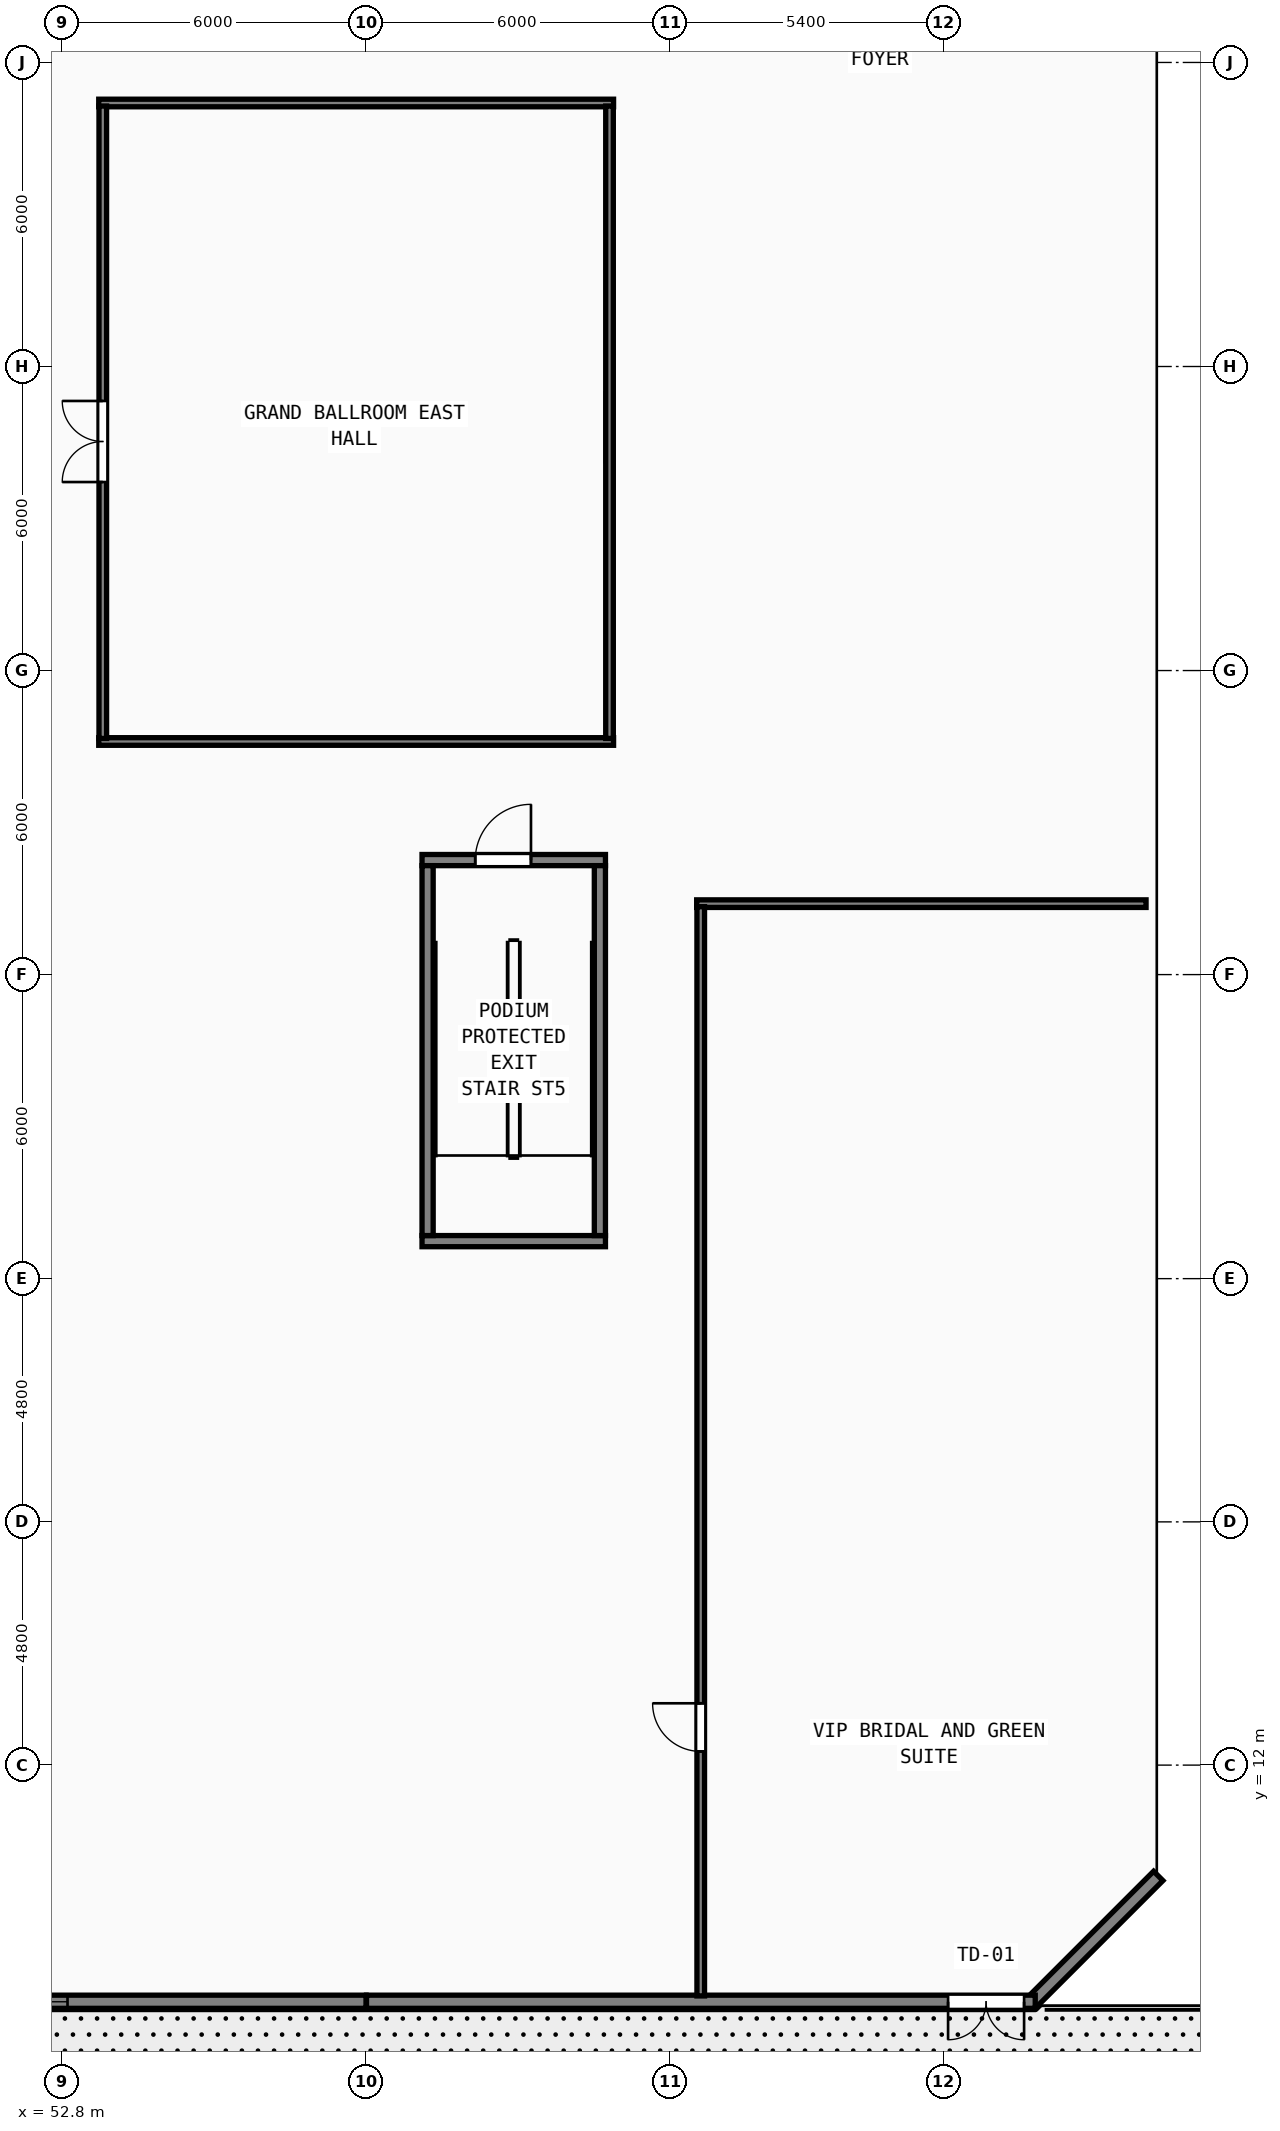
"""IFC4 building model, lengths in metres.
Left out: names, types, materials, properties, quantities, classifications, styles, units other than length and angle.
Written with IfcOpenShell. Run it as: python <this file> out.ifc"""

import sys

from ifc_helpers import new_model, si_unit, direction, frame, frame_2d, origin, origin_2d, place, context, subcontext, project, spatial, rectangle, hollow_rectangle, i_section, extrude, element, fill, save


model = new_model("IFC4")
c1 = context("Model", 3, precision=1e-05, world=origin(), true_north=direction((0.0, 1.0)))
c2 = subcontext(c1, "Body", "Model", "MODEL_VIEW")
j1 = project(units=[si_unit("LENGTHUNIT", "METRE"), si_unit("PLANEANGLEUNIT", "RADIAN")], contexts=[c1])
p1 = place(None, origin())
s1 = spatial("IfcSite", under=j1, at=p1, CompositionType="ELEMENT")
p2 = place(p1, origin())
s2 = spatial("IfcBuilding", under=s1, at=p2, CompositionType="ELEMENT")
p3 = place(p2, frame((0.0, 0.0, 10.2)))
s3 = spatial("IfcBuildingStorey", under=s2, at=p3, CompositionType="ELEMENT", Elevation=10.2)
p4 = place(p3, frame((59.9, 29.86, 0.0), z_axis=(0.0, 0.0, 1.0), x_axis=(1.0, 0.0, 0.0)))
e1 = element("IfcWall", 1, at=p4, inside=s3, PredefinedType="SHEAR", context=c2, shape_type="SweptSolid", body=[
    extrude(rectangle(XDim=3.62, YDim=0.22, at=frame_2d((1.81, 0.0))), origin(), (0.0, 0.0, 1.0), 5.16),
])
p5 = place(p4, frame((1.05, 0.0, 0.0)))
e2 = element("IfcOpeningElement", 2, at=p5, cuts=e1, PredefinedType="OPENING", context=c2, shape_type="SweptSolid", body=[
    extrude(rectangle(XDim=1.1, YDim=2.15, at=frame_2d((0.55, 1.075))), frame((0.0, 0.12, 0.0), z_axis=(0.0, -1.0, 0.0), x_axis=(1.0, 0.0, 0.0)), (0.0, 0.0, 1.0), 0.24),
])
p6 = place(p3, frame((59.9, 22.34, 0.0), z_axis=(0.0, 0.0, 1.0), x_axis=(1.0, 0.0, 0.0)))
e3 = element("IfcWall", 3, at=p6, inside=s3, PredefinedType="SHEAR", context=c2, shape_type="SweptSolid", body=[
    extrude(rectangle(XDim=3.62, YDim=0.22, at=frame_2d((1.81, 0.0))), origin(), (0.0, 0.0, 1.0), 5.16),
])
for number, where, z_axis, x_axis in (
    (4, (60.01, 22.45, 0.0), (0.0, 0.0, 1.0), (0.0, 1.0, 0.0)),
    (5, (63.41, 22.45, 0.0), (0.0, 0.0, 1.0), (0.0, 1.0, 0.0)),
):
    element("IfcWall", number, at=place(p3, frame(where, z_axis=z_axis, x_axis=x_axis)), inside=s3, PredefinedType="SHEAR", context=c2, shape_type="SweptSolid", body=[
        extrude(rectangle(XDim=7.3, YDim=0.22, at=frame_2d((3.65, 0.0))), origin(), (0.0, 0.0, 1.0), 5.16),
    ])
for number, where, z_axis, x_axis in (
    (6, (52.8, 21.6, 0.0), (0.0, 0.0, 1.0), (1.0, 0.0, 0.0)),
    (7, (52.8, 33.6, 0.0), (0.0, 0.0, 1.0), (1.0, 0.0, 0.0)),
    (8, (52.8, 45.6, 0.0), (0.0, 0.0, 1.0), (1.0, 0.0, 0.0)),
    (9, (64.2, 16.8, 0.0), (0.0, 0.0, 1.0), (1.0, 0.0, 0.0)),
    (10, (64.2, 27.6, 0.0), (0.0, 0.0, 1.0), (1.0, 0.0, 0.0)),
    (11, (64.2, 38.4, 0.0), (0.0, 0.0, 1.0), (1.0, 0.0, 0.0)),
):
    element("IfcColumn", number, at=place(p3, frame(where, z_axis=z_axis, x_axis=x_axis)), inside=s3, PredefinedType="COLUMN", context=c2, shape_type="SweptSolid", body=[
        extrude(hollow_rectangle(XDim=1.3, YDim=1.3, WallThickness=0.048, at=origin_2d()), origin(), (0.0, 0.0, 1.0), 5.4),
    ])
for number, where, z_axis, x_axis in (
    (12, (70.8, 17.4, 0.0), (0.0, 0.0, 1.0), (1.0, 0.0, 0.0)),
    (13, (70.8, 27.6, 0.0), (0.0, 0.0, 1.0), (1.0, 0.0, 0.0)),
):
    element("IfcColumn", number, at=place(p3, frame(where, z_axis=z_axis, x_axis=x_axis)), inside=s3, PredefinedType="COLUMN", context=c2, shape_type="SweptSolid", body=[
        extrude(hollow_rectangle(XDim=1.15, YDim=1.15, WallThickness=0.042, at=origin_2d()), origin(), (0.0, 0.0, 1.0), 5.4),
    ])
for number, where, z_axis, x_axis in (
    (14, (58.8, 7.4, 0.0), (0.0, 0.0, 1.0), (1.0, 0.0, 0.0)),
    (15, (58.8, 11.0, 0.0), (0.0, 0.0, 1.0), (1.0, 0.0, 0.0)),
    (16, (58.8, 13.2, 0.0), (0.0, 0.0, 1.0), (1.0, 0.0, 0.0)),
    (17, (58.8, 16.8, 0.0), (0.0, 0.0, 1.0), (1.0, 0.0, 0.0)),
):
    element("IfcColumn", number, at=place(p3, frame(where, z_axis=z_axis, x_axis=x_axis)), inside=s3, PredefinedType="COLUMN", context=c2, shape_type="SweptSolid", body=[
        extrude(i_section(OverallWidth=0.3, OverallDepth=0.3, WebThickness=0.01, FlangeThickness=0.015, FilletRadius=0.018, at=origin_2d()), origin(), (0.0, 0.0, 1.0), 5.4),
    ])
p7 = place(p3, frame((71.907, 7.291, 0.0), z_axis=(0.0, 0.0, 1.0), x_axis=(0.707106781187, 0.707106781187, 0.0)))
e18 = element("IfcWall", 18, at=p7, inside=s3, PredefinedType="SOLIDWALL", context=c2, shape_type="SweptSolid", body=[
    extrude(rectangle(XDim=3.567, YDim=0.26, at=frame_2d((1.783, 0.0))), origin(), (0.0, 0.0, 1.0), 5.16),
])
p8 = place(p3, frame((18.004, 7.33, 0.0), z_axis=(0.0, 0.0, 1.0), x_axis=(1.0, 0.0, 0.0)))
e19 = element("IfcWall", 19, at=p8, inside=s3, PredefinedType="SOLIDWALL", context=c2, shape_type="SweptSolid", body=[
    extrude(rectangle(XDim=40.792, YDim=0.26, at=frame_2d((20.396, 0.0))), origin(), (0.0, 0.0, 1.0), 5.16),
])
p9 = place(p8, frame((0.7, 0.0, 0.85)))
e20 = element("IfcOpeningElement", 20, at=p9, cuts=e19, PredefinedType="OPENING", context=c2, shape_type="SweptSolid", body=[
    extrude(rectangle(XDim=1.8, YDim=2.2, at=frame_2d((0.9, 1.1))), frame((0.0, 0.14, 0.0), z_axis=(0.0, -1.0, 0.0), x_axis=(1.0, 0.0, 0.0)), (0.0, 0.0, 1.0), 0.28),
])
p10 = place(p8, frame((6.1, 0.0, 0.85)))
e21 = element("IfcOpeningElement", 21, at=p10, cuts=e19, PredefinedType="OPENING", context=c2, shape_type="SweptSolid", body=[
    extrude(rectangle(XDim=1.8, YDim=2.2, at=frame_2d((0.9, 1.1))), frame((0.0, 0.14, 0.0), z_axis=(0.0, -1.0, 0.0), x_axis=(1.0, 0.0, 0.0)), (0.0, 0.0, 1.0), 0.28),
])
p11 = place(p8, frame((11.5, 0.0, 0.85)))
e22 = element("IfcOpeningElement", 22, at=p11, cuts=e19, PredefinedType="OPENING", context=c2, shape_type="SweptSolid", body=[
    extrude(rectangle(XDim=1.8, YDim=2.2, at=frame_2d((0.9, 1.1))), frame((0.0, 0.14, 0.0), z_axis=(0.0, -1.0, 0.0), x_axis=(1.0, 0.0, 0.0)), (0.0, 0.0, 1.0), 0.28),
])
p12 = place(p8, frame((16.9, 0.0, 0.85)))
e23 = element("IfcOpeningElement", 23, at=p12, cuts=e19, PredefinedType="OPENING", context=c2, shape_type="SweptSolid", body=[
    extrude(rectangle(XDim=1.8, YDim=2.2, at=frame_2d((0.9, 1.1))), frame((0.0, 0.14, 0.0), z_axis=(0.0, -1.0, 0.0), x_axis=(1.0, 0.0, 0.0)), (0.0, 0.0, 1.0), 0.28),
])
p13 = place(p8, frame((22.3, 0.0, 0.85)))
e24 = element("IfcOpeningElement", 24, at=p13, cuts=e19, PredefinedType="OPENING", context=c2, shape_type="SweptSolid", body=[
    extrude(rectangle(XDim=1.8, YDim=2.2, at=frame_2d((0.9, 1.1))), frame((0.0, 0.14, 0.0), z_axis=(0.0, -1.0, 0.0), x_axis=(1.0, 0.0, 0.0)), (0.0, 0.0, 1.0), 0.28),
])
p14 = place(p8, frame((27.7, 0.0, 0.85)))
e25 = element("IfcOpeningElement", 25, at=p14, cuts=e19, PredefinedType="OPENING", context=c2, shape_type="SweptSolid", body=[
    extrude(rectangle(XDim=1.8, YDim=2.2, at=frame_2d((0.9, 1.1))), frame((0.0, 0.14, 0.0), z_axis=(0.0, -1.0, 0.0), x_axis=(1.0, 0.0, 0.0)), (0.0, 0.0, 1.0), 0.28),
])
p15 = place(p8, frame((33.1, 0.0, 0.85)))
e26 = element("IfcOpeningElement", 26, at=p15, cuts=e19, PredefinedType="OPENING", context=c2, shape_type="SweptSolid", body=[
    extrude(rectangle(XDim=1.8, YDim=2.2, at=frame_2d((0.9, 1.1))), frame((0.0, 0.14, 0.0), z_axis=(0.0, -1.0, 0.0), x_axis=(1.0, 0.0, 0.0)), (0.0, 0.0, 1.0), 0.28),
])
p16 = place(p3, frame((58.804, 7.33, 0.0), z_axis=(0.0, 0.0, 1.0), x_axis=(1.0, 0.0, 0.0)))
e27 = element("IfcWall", 27, at=p16, inside=s3, PredefinedType="SOLIDWALL", context=c2, shape_type="SweptSolid", body=[
    extrude(rectangle(XDim=13.197, YDim=0.26, at=frame_2d((6.599, 0.0))), origin(), (0.0, 0.0, 1.0), 5.16),
])
p17 = place(p16, frame((12.977, 0.0, 0.0), z_axis=(0.0, 0.0, 1.0), x_axis=(-1.0, 0.0, 0.0)))
e28 = element("IfcOpeningElement", 28, at=p17, cuts=e27, PredefinedType="OPENING", context=c2, shape_type="SweptSolid", body=[
    extrude(rectangle(XDim=1.5, YDim=2.2, at=frame_2d((0.75, 1.1))), frame((0.0, 0.14, 0.0), z_axis=(0.0, -1.0, 0.0), x_axis=(1.0, 0.0, 0.0)), (0.0, 0.0, 1.0), 0.28),
])
for number, where, z_axis, x_axis in (
    (29, (53.52, 44.8, 0.0), (0.0, 0.0, 1.0), (1.0, 0.0, 0.0)),
    (30, (53.52, 32.2, 0.0), (0.0, 0.0, 1.0), (1.0, 0.0, 0.0)),
):
    element("IfcWall", number, at=place(p3, frame(where, z_axis=z_axis, x_axis=x_axis)), inside=s3, PredefinedType="PARTITIONING", context=c2, shape_type="SweptSolid", body=[
        extrude(rectangle(XDim=10.16, YDim=0.15, at=frame_2d((5.08, 0.0))), origin(), (0.0, 0.0, 1.0), 5.16),
    ])
p18 = place(p3, frame((53.6, 32.26, 0.0), z_axis=(0.0, 0.0, 1.0), x_axis=(0.0, 1.0, 0.0)))
e31 = element("IfcWall", 31, at=p18, inside=s3, PredefinedType="PARTITIONING", context=c2, shape_type="SweptSolid", body=[
    extrude(rectangle(XDim=12.48, YDim=0.15, at=frame_2d((6.24, 0.0))), origin(), (0.0, 0.0, 1.0), 5.16),
])
p19 = place(p18, frame((5.06, 0.0, 0.0)))
e32 = element("IfcOpeningElement", 32, at=p19, cuts=e31, PredefinedType="OPENING", context=c2, shape_type="SweptSolid", body=[
    extrude(rectangle(XDim=1.6, YDim=2.25, at=frame_2d((0.8, 1.125))), frame((0.0, 0.085, 0.0), z_axis=(0.0, -1.0, 0.0), x_axis=(1.0, 0.0, 0.0)), (0.0, 0.0, 1.0), 0.17),
])
p20 = place(p3, frame((63.6, 32.26, 0.0), z_axis=(0.0, 0.0, 1.0), x_axis=(0.0, 1.0, 0.0)))
e33 = element("IfcWall", 33, at=p20, inside=s3, PredefinedType="PARTITIONING", context=c2, shape_type="SweptSolid", body=[
    extrude(rectangle(XDim=12.48, YDim=0.15, at=frame_2d((6.24, 0.0))), origin(), (0.0, 0.0, 1.0), 5.16),
])
p21 = place(p3, frame((65.32, 29.0, 0.0), z_axis=(0.0, 0.0, 1.0), x_axis=(1.0, 0.0, 0.0)))
e34 = element("IfcWall", 34, at=p21, inside=s3, PredefinedType="PARTITIONING", context=c2, shape_type="SweptSolid", body=[
    extrude(rectangle(XDim=8.868, YDim=0.15, at=frame_2d((4.434, 0.0))), origin(), (0.0, 0.0, 1.0), 5.16),
])
p22 = place(p3, frame((65.4, 7.445, 0.0), z_axis=(0.0, 0.0, 1.0), x_axis=(0.0, 1.0, 0.0)))
e35 = element("IfcWall", 35, at=p22, inside=s3, PredefinedType="PARTITIONING", context=c2, shape_type="SweptSolid", body=[
    extrude(rectangle(XDim=21.495, YDim=0.15, at=frame_2d((10.748, 0.0))), origin(), (0.0, 0.0, 1.0), 5.16),
])
p23 = place(p22, frame((4.825, 0.0, 0.0)))
e36 = element("IfcOpeningElement", 36, at=p23, cuts=e35, PredefinedType="OPENING", context=c2, shape_type="SweptSolid", body=[
    extrude(rectangle(XDim=0.95, YDim=2.12, at=frame_2d((0.475, 1.06))), frame((0.0, 0.085, 0.0), z_axis=(0.0, -1.0, 0.0), x_axis=(1.0, 0.0, 0.0)), (0.0, 0.0, 1.0), 0.17),
])
p24 = place(p15, origin())
e37 = element("IfcWindow", 37, at=p24, inside=s3, PartitioningType="SINGLE_PANEL", PredefinedType="WINDOW", context=c2, shape_type="SweptSolid", body=[
    extrude(rectangle(XDim=1.8, YDim=2.2, at=frame_2d((0.9, 1.1))), frame((0.0, 0.03, 0.0), z_axis=(0.0, -1.0, 0.0), x_axis=(1.0, 0.0, 0.0)), (0.0, 0.0, 1.0), 0.06),
])
fill(e26, e37)
p25 = place(p17, origin())
e38 = element("IfcDoor", 38, at=p25, inside=s3, OperationType="DOUBLE_DOOR_SINGLE_SWING", PredefinedType="DOOR", context=c2, shape_type="SweptSolid", body=[
    extrude(rectangle(XDim=1.5, YDim=2.2, at=frame_2d((0.75, 1.1))), frame((0.0, 0.025, 0.0), z_axis=(0.0, -1.0, 0.0), x_axis=(1.0, 0.0, 0.0)), (0.0, 0.0, 1.0), 0.05),
])
fill(e28, e38)
p26 = place(p5, origin())
e39 = element("IfcDoor", 39, at=p26, inside=s3, OperationType="SINGLE_SWING_RIGHT", PredefinedType="DOOR", context=c2, shape_type="SweptSolid", body=[
    extrude(rectangle(XDim=1.1, YDim=2.15, at=frame_2d((0.55, 1.075))), frame((0.0, 0.025, 0.0), z_axis=(0.0, -1.0, 0.0), x_axis=(1.0, 0.0, 0.0)), (0.0, 0.0, 1.0), 0.05),
])
fill(e2, e39)
p27 = place(p19, origin())
e40 = element("IfcDoor", 40, at=p27, inside=s3, OperationType="DOUBLE_DOOR_SINGLE_SWING", PredefinedType="DOOR", context=c2, shape_type="SweptSolid", body=[
    extrude(rectangle(XDim=1.6, YDim=2.25, at=frame_2d((0.8, 1.125))), frame((0.0, 0.025, 0.0), z_axis=(0.0, -1.0, 0.0), x_axis=(1.0, 0.0, 0.0)), (0.0, 0.0, 1.0), 0.05),
])
fill(e32, e40)
p28 = place(p23, origin())
e41 = element("IfcDoor", 41, at=p28, inside=s3, OperationType="SINGLE_SWING_RIGHT", PredefinedType="DOOR", context=c2, shape_type="SweptSolid", body=[
    extrude(rectangle(XDim=0.95, YDim=2.12, at=frame_2d((0.475, 1.06))), frame((0.0, 0.025, 0.0), z_axis=(0.0, -1.0, 0.0), x_axis=(1.0, 0.0, 0.0)), (0.0, 0.0, 1.0), 0.05),
])
fill(e36, e41)
save(model, sys.argv[1])
